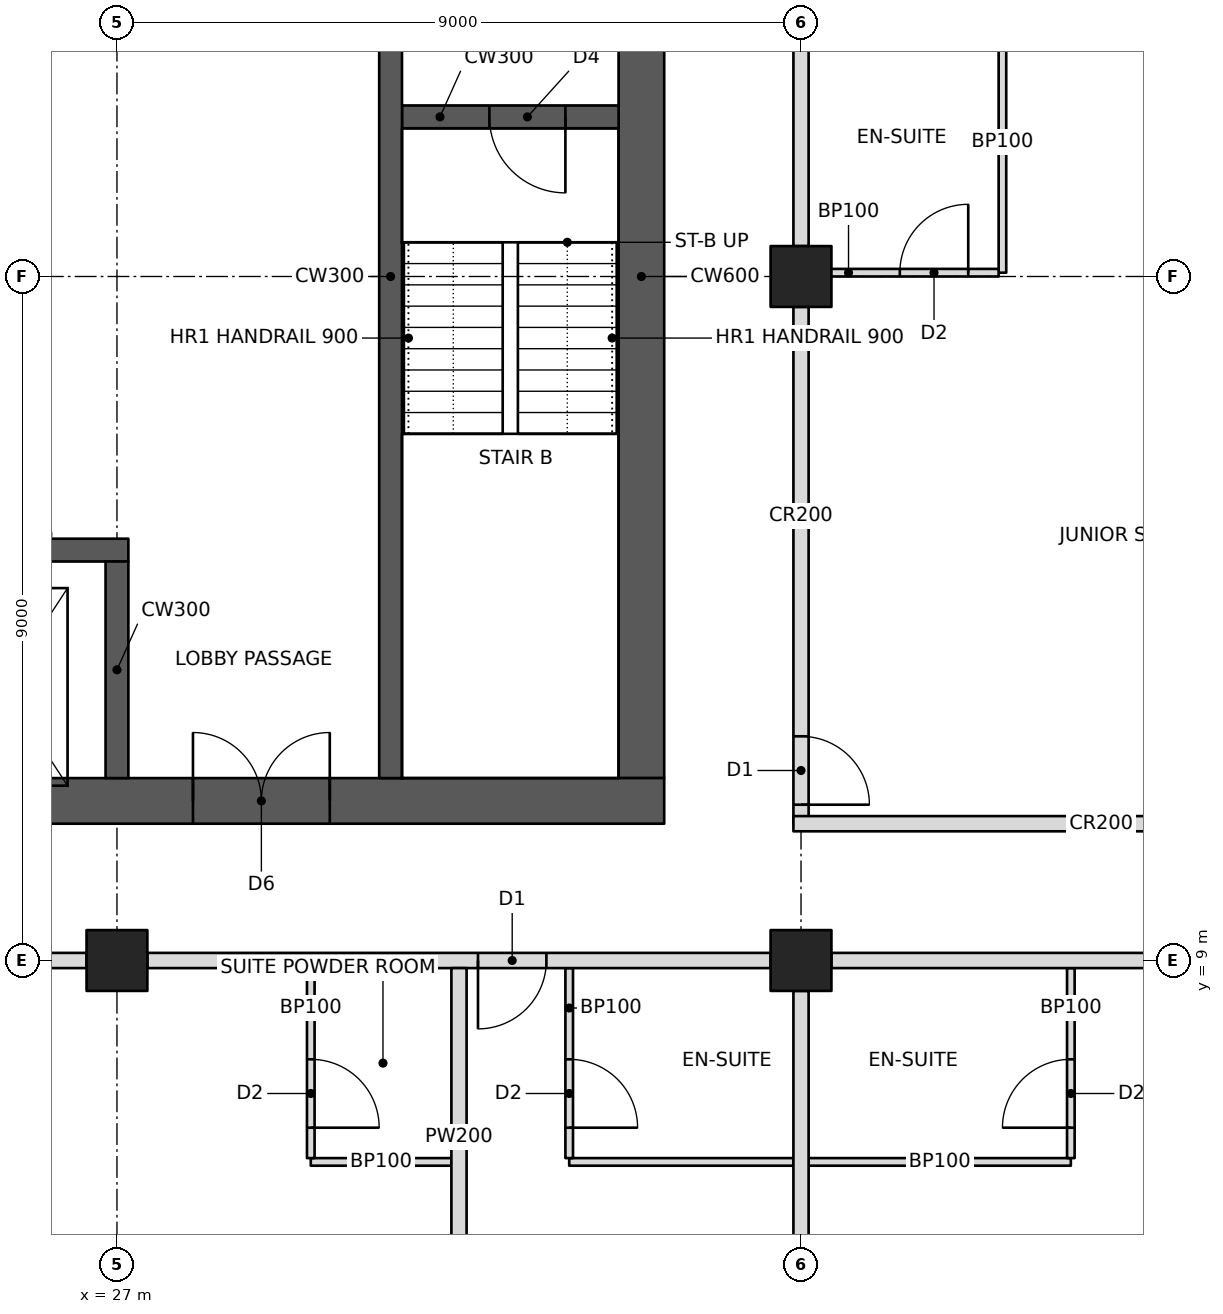
"""IFC4 building model, lengths in metres.
Left out: names, types, materials, properties, quantities, classifications, styles, units other than length and angle.
Written with IfcOpenShell. Run it as: python <this file> out.ifc"""

import sys

from ifc_helpers import new_model, si_unit, direction, frame, frame_2d, origin, origin_2d, place, context, subcontext, project, spatial, rectangle, hollow_rectangle, extrude, element, fill, save


model = new_model("IFC4")
c1 = context("Model", 3, precision=1e-05, world=origin(), true_north=direction((0.0, 1.0)))
c2 = subcontext(c1, "Body", "Model", "MODEL_VIEW")
j1 = project(units=[si_unit("LENGTHUNIT", "METRE"), si_unit("PLANEANGLEUNIT", "RADIAN")], contexts=[c1])
p1 = place(None, origin())
s1 = spatial("IfcSite", under=j1, at=p1, CompositionType="ELEMENT")
p2 = place(p1, origin())
s2 = spatial("IfcBuilding", under=s1, at=p2, CompositionType="ELEMENT")
p3 = place(p2, frame((0.0, 0.0, 148.6)))
s3 = spatial("IfcBuildingStorey", under=s2, at=p3, CompositionType="ELEMENT", Elevation=148.6)
for number, where, z_axis, x_axis in (
    (1, (27.0, 9.0, 0.0), (0.0, 0.0, 1.0), (1.0, 0.0, 0.0)),
    (2, (36.0, 9.0, 0.0), (0.0, 0.0, 1.0), (0.0, 1.0, 0.0)),
    (3, (36.0, 18.0, 0.0), (0.0, 0.0, 1.0), (0.0, 1.0, 0.0)),
):
    element("IfcColumn", number, at=place(p3, frame(where, z_axis=z_axis, x_axis=x_axis)), inside=s3, PredefinedType="COLUMN", context=c2, shape_type="SweptSolid", body=[
        extrude(hollow_rectangle(XDim=0.8, YDim=0.8, WallThickness=0.07, at=origin_2d()), origin(), (0.0, 0.0, 1.0), 3.4),
    ])
p4 = place(p3, frame((10.8, 11.1, 0.0), z_axis=(0.0, 0.0, 1.0), x_axis=(1.0, 0.0, 0.0)))
e4 = element("IfcWall", 4, at=p4, inside=s3, PredefinedType="SHEAR", context=c2, shape_type="SweptSolid", body=[
    extrude(rectangle(XDim=23.4, YDim=0.6, at=frame_2d((11.7, 0.0))), origin(), (0.0, 0.0, 1.0), 3.4),
])
p5 = place(p4, frame((1.0, 0.0, 0.0)))
e5 = element("IfcOpeningElement", 5, at=p5, cuts=e4, PredefinedType="OPENING", context=c2, shape_type="SweptSolid", body=[
    extrude(rectangle(XDim=1.0, YDim=2.1, at=frame_2d((0.5, 1.05))), frame((0.0, 0.31, 0.0), z_axis=(0.0, -1.0, 0.0), x_axis=(1.0, 0.0, 0.0)), (0.0, 0.0, 1.0), 0.62),
])
p6 = place(p4, frame((17.2, 0.0, 0.0)))
e6 = element("IfcOpeningElement", 6, at=p6, cuts=e4, PredefinedType="OPENING", context=c2, shape_type="SweptSolid", body=[
    extrude(rectangle(XDim=1.8, YDim=2.1, at=frame_2d((0.9, 1.05))), frame((0.0, 0.31, 0.0), z_axis=(0.0, -1.0, 0.0), x_axis=(1.0, 0.0, 0.0)), (0.0, 0.0, 1.0), 0.62),
])
p7 = place(p3, frame((33.9, 11.4, 0.0), z_axis=(0.0, 0.0, 1.0), x_axis=(0.0, 1.0, 0.0)))
e7 = element("IfcWall", 7, at=p7, inside=s3, PredefinedType="SHEAR", context=c2, shape_type="SweptSolid", body=[
    extrude(rectangle(XDim=13.2, YDim=0.6, at=frame_2d((6.6, 0.0))), origin(), (0.0, 0.0, 1.0), 3.4),
])
p8 = place(p3, frame((18.15, 14.4, 0.0), z_axis=(0.0, 0.0, 1.0), x_axis=(1.0, 0.0, 0.0)))
e8 = element("IfcWall", 8, at=p8, inside=s3, PredefinedType="SHEAR", context=c2, shape_type="SweptSolid", body=[
    extrude(rectangle(XDim=9.0, YDim=0.3, at=frame_2d((4.5, 0.0))), origin(), (0.0, 0.0, 1.0), 3.4),
])
p9 = place(p8, frame((0.8, 0.0, 0.0)))
e9 = element("IfcOpeningElement", 9, at=p9, cuts=e8, PredefinedType="OPENING", context=c2, shape_type="SweptSolid", body=[
    extrude(rectangle(XDim=1.1, YDim=2.1, at=frame_2d((0.55, 1.05))), frame((0.0, 0.16, 0.0), z_axis=(0.0, -1.0, 0.0), x_axis=(1.0, 0.0, 0.0)), (0.0, 0.0, 1.0), 0.32),
])
p10 = place(p8, frame((3.8, 0.0, 0.0)))
e10 = element("IfcOpeningElement", 10, at=p10, cuts=e8, PredefinedType="OPENING", context=c2, shape_type="SweptSolid", body=[
    extrude(rectangle(XDim=1.1, YDim=2.1, at=frame_2d((0.55, 1.05))), frame((0.0, 0.16, 0.0), z_axis=(0.0, -1.0, 0.0), x_axis=(1.0, 0.0, 0.0)), (0.0, 0.0, 1.0), 0.32),
])
p11 = place(p8, frame((6.75, 0.0, 0.0)))
e11 = element("IfcOpeningElement", 11, at=p11, cuts=e8, PredefinedType="OPENING", context=c2, shape_type="SweptSolid", body=[
    extrude(rectangle(XDim=1.2, YDim=2.1, at=frame_2d((0.6, 1.05))), frame((0.0, 0.16, 0.0), z_axis=(0.0, -1.0, 0.0), x_axis=(1.0, 0.0, 0.0)), (0.0, 0.0, 1.0), 0.32),
])
p12 = place(p3, frame((27.0, 11.4, 0.0), z_axis=(0.0, 0.0, 1.0), x_axis=(0.0, 1.0, 0.0)))
e12 = element("IfcWall", 12, at=p12, inside=s3, PredefinedType="SHEAR", context=c2, shape_type="SweptSolid", body=[
    extrude(rectangle(XDim=2.85, YDim=0.3, at=frame_2d((1.425, 0.0))), origin(), (0.0, 0.0, 1.0), 3.4),
])
p13 = place(p3, frame((30.6, 11.4, 0.0), z_axis=(0.0, 0.0, 1.0), x_axis=(0.0, 1.0, 0.0)))
e13 = element("IfcWall", 13, at=p13, inside=s3, PredefinedType="SHEAR", context=c2, shape_type="SweptSolid", body=[
    extrude(rectangle(XDim=13.2, YDim=0.3, at=frame_2d((6.6, 0.0))), origin(), (0.0, 0.0, 1.0), 3.4),
])
p14 = place(p3, frame((30.75, 20.1, 0.0), z_axis=(0.0, 0.0, 1.0), x_axis=(1.0, 0.0, 0.0)))
e14 = element("IfcWall", 14, at=p14, inside=s3, PredefinedType="SHEAR", context=c2, shape_type="SweptSolid", body=[
    extrude(rectangle(XDim=2.85, YDim=0.3, at=frame_2d((1.425, 0.0))), origin(), (0.0, 0.0, 1.0), 3.4),
])
p15 = place(p14, frame((1.15, 0.0, 0.0)))
e15 = element("IfcOpeningElement", 15, at=p15, cuts=e14, PredefinedType="OPENING", context=c2, shape_type="SweptSolid", body=[
    extrude(rectangle(XDim=1.0, YDim=2.1, at=frame_2d((0.5, 1.05))), frame((0.0, 0.16, 0.0), z_axis=(0.0, -1.0, 0.0), x_axis=(1.0, 0.0, 0.0)), (0.0, 0.0, 1.0), 0.32),
])
p16 = place(p3, frame((18.4, 9.0, 0.0), z_axis=(0.0, 0.0, 1.0), x_axis=(1.0, 0.0, 0.0)))
e16 = element("IfcWall", 16, at=p16, inside=s3, PredefinedType="PARTITIONING", context=c2, shape_type="SweptSolid", body=[
    extrude(rectangle(XDim=8.2, YDim=0.2, at=frame_2d((4.1, 0.0))), origin(), (0.0, 0.0, 1.0), 2.405),
])
p17 = place(p16, frame((2.95, 0.0, 0.0)))
e17 = element("IfcOpeningElement", 17, at=p17, cuts=e16, PredefinedType="OPENING", context=c2, shape_type="SweptSolid", body=[
    extrude(rectangle(XDim=0.9, YDim=2.1, at=frame_2d((0.45, 1.05))), frame((0.0, 0.11, 0.0), z_axis=(0.0, -1.0, 0.0), x_axis=(1.0, 0.0, 0.0)), (0.0, 0.0, 1.0), 0.22),
])
p18 = place(p16, frame((4.35, 0.0, 0.0)))
e18 = element("IfcOpeningElement", 18, at=p18, cuts=e16, PredefinedType="OPENING", context=c2, shape_type="SweptSolid", body=[
    extrude(rectangle(XDim=0.9, YDim=2.1, at=frame_2d((0.45, 1.05))), frame((0.0, 0.11, 0.0), z_axis=(0.0, -1.0, 0.0), x_axis=(1.0, 0.0, 0.0)), (0.0, 0.0, 1.0), 0.22),
])
p19 = place(p3, frame((27.4, 9.0, 0.0), z_axis=(0.0, 0.0, 1.0), x_axis=(1.0, 0.0, 0.0)))
e19 = element("IfcWall", 19, at=p19, inside=s3, PredefinedType="PARTITIONING", context=c2, shape_type="SweptSolid", body=[
    extrude(rectangle(XDim=8.2, YDim=0.2, at=frame_2d((4.1, 0.0))), origin(), (0.0, 0.0, 1.0), 2.405),
])
p20 = place(p19, frame((4.35, 0.0, 0.0)))
e20 = element("IfcOpeningElement", 20, at=p20, cuts=e19, PredefinedType="OPENING", context=c2, shape_type="SweptSolid", body=[
    extrude(rectangle(XDim=0.9, YDim=2.1, at=frame_2d((0.45, 1.05))), frame((0.0, 0.11, 0.0), z_axis=(0.0, -1.0, 0.0), x_axis=(1.0, 0.0, 0.0)), (0.0, 0.0, 1.0), 0.22),
])
p21 = place(p3, frame((36.4, 9.0, 0.0), z_axis=(0.0, 0.0, 1.0), x_axis=(1.0, 0.0, 0.0)))
e21 = element("IfcWall", 21, at=p21, inside=s3, PredefinedType="PARTITIONING", context=c2, shape_type="SweptSolid", body=[
    extrude(rectangle(XDim=7.6, YDim=0.2, at=frame_2d((3.8, 0.0))), origin(), (0.0, 0.0, 1.0), 2.438),
])
p22 = place(p21, frame((6.45, 0.0, 0.0)))
e22 = element("IfcOpeningElement", 22, at=p22, cuts=e21, PredefinedType="OPENING", context=c2, shape_type="SweptSolid", body=[
    extrude(rectangle(XDim=0.9, YDim=2.1, at=frame_2d((0.45, 1.05))), frame((0.0, 0.11, 0.0), z_axis=(0.0, -1.0, 0.0), x_axis=(1.0, 0.0, 0.0)), (0.0, 0.0, 1.0), 0.22),
])
p23 = place(p3, frame((36.0, 10.8, 0.0), z_axis=(0.0, 0.0, 1.0), x_axis=(0.0, 1.0, 0.0)))
e23 = element("IfcWall", 23, at=p23, inside=s3, PredefinedType="PARTITIONING", context=c2, shape_type="SweptSolid", body=[
    extrude(rectangle(XDim=6.8, YDim=0.2, at=frame_2d((3.4, 0.0))), origin(), (0.0, 0.0, 1.0), 2.405),
])
p24 = place(p23, frame((0.25, 0.0, 0.0)))
e24 = element("IfcOpeningElement", 24, at=p24, cuts=e23, PredefinedType="OPENING", context=c2, shape_type="SweptSolid", body=[
    extrude(rectangle(XDim=0.9, YDim=2.1, at=frame_2d((0.45, 1.05))), frame((0.0, 0.11, 0.0), z_axis=(0.0, -1.0, 0.0), x_axis=(1.0, 0.0, 0.0)), (0.0, 0.0, 1.0), 0.22),
])
p25 = place(p3, frame((36.0, 18.4, 0.0), z_axis=(0.0, 0.0, 1.0), x_axis=(0.0, 1.0, 0.0)))
e25 = element("IfcWall", 25, at=p25, inside=s3, PredefinedType="PARTITIONING", context=c2, shape_type="SweptSolid", body=[
    extrude(rectangle(XDim=6.8, YDim=0.2, at=frame_2d((3.4, 0.0))), origin(), (0.0, 0.0, 1.0), 2.405),
])
p26 = place(p25, frame((3.45, 0.0, 0.0)))
e26 = element("IfcOpeningElement", 26, at=p26, cuts=e25, PredefinedType="OPENING", context=c2, shape_type="SweptSolid", body=[
    extrude(rectangle(XDim=0.9, YDim=2.1, at=frame_2d((0.45, 1.05))), frame((0.0, 0.11, 0.0), z_axis=(0.0, -1.0, 0.0), x_axis=(1.0, 0.0, 0.0)), (0.0, 0.0, 1.0), 0.22),
])
p27 = place(p3, frame((35.9, 10.8, 0.0), z_axis=(0.0, 0.0, 1.0), x_axis=(1.0, 0.0, 0.0)))
e27 = element("IfcWall", 27, at=p27, inside=s3, PredefinedType="PARTITIONING", context=c2, shape_type="SweptSolid", body=[
    extrude(rectangle(XDim=8.1, YDim=0.2, at=frame_2d((4.05, 0.0))), origin(), (0.0, 0.0, 1.0), 2.404),
])
p28 = place(p3, frame((31.5, 8.9, 0.0), z_axis=(0.0, 0.0, 1.0), x_axis=(0.0, -1.0, 0.0)))
e28 = element("IfcWall", 28, at=p28, inside=s3, PredefinedType="PARTITIONING", context=c2, shape_type="SweptSolid", body=[
    extrude(rectangle(XDim=7.9, YDim=0.2, at=frame_2d((3.95, 0.0))), origin(), (0.0, 0.0, 1.0), 2.404),
])
p29 = place(p28, frame((4.6, 0.0, 0.0)))
e29 = element("IfcOpeningElement", 29, at=p29, cuts=e28, PredefinedType="OPENING", context=c2, shape_type="SweptSolid", body=[
    extrude(rectangle(XDim=1.0, YDim=2.1, at=frame_2d((0.5, 1.05))), frame((0.0, 0.11, 0.0), z_axis=(0.0, -1.0, 0.0), x_axis=(1.0, 0.0, 0.0)), (0.0, 0.0, 1.0), 0.22),
])
p30 = place(p3, frame((36.0, 8.6, 0.0), z_axis=(0.0, 0.0, 1.0), x_axis=(0.0, -1.0, 0.0)))
e30 = element("IfcWall", 30, at=p30, inside=s3, PredefinedType="PARTITIONING", context=c2, shape_type="SweptSolid", body=[
    extrude(rectangle(XDim=7.6, YDim=0.2, at=frame_2d((3.8, 0.0))), origin(), (0.0, 0.0, 1.0), 2.438),
])
p31 = place(p3, frame((29.55, 6.35, 0.0), z_axis=(0.0, 0.0, 1.0), x_axis=(1.0, 0.0, 0.0)))
e31 = element("IfcWall", 31, at=p31, inside=s3, PredefinedType="PARTITIONING", context=c2, shape_type="SweptSolid", body=[
    extrude(rectangle(XDim=1.85, YDim=0.1, at=frame_2d((0.925, 0.0))), origin(), (0.0, 0.0, 1.0), 3.2),
])
p32 = place(p3, frame((29.55, 8.9, 0.0), z_axis=(0.0, 0.0, 1.0), x_axis=(0.0, -1.0, 0.0)))
e32 = element("IfcWall", 32, at=p32, inside=s3, PredefinedType="PARTITIONING", context=c2, shape_type="SweptSolid", body=[
    extrude(rectangle(XDim=2.5, YDim=0.1, at=frame_2d((1.25, 0.0))), origin(), (0.0, 0.0, 1.0), 2.404),
])
p33 = place(p32, frame((1.2, 0.0, 0.0)))
e33 = element("IfcOpeningElement", 33, at=p33, cuts=e32, PredefinedType="OPENING", context=c2, shape_type="SweptSolid", body=[
    extrude(rectangle(XDim=0.9, YDim=2.1, at=frame_2d((0.45, 1.05))), frame((0.0, 0.06, 0.0), z_axis=(0.0, -1.0, 0.0), x_axis=(1.0, 0.0, 0.0)), (0.0, 0.0, 1.0), 0.12),
])
p34 = place(p3, frame((32.95, 6.35, 0.0), z_axis=(0.0, 0.0, 1.0), x_axis=(1.0, 0.0, 0.0)))
e34 = element("IfcWall", 34, at=p34, inside=s3, PredefinedType="PARTITIONING", context=c2, shape_type="SweptSolid", body=[
    extrude(rectangle(XDim=2.95, YDim=0.1, at=frame_2d((1.475, 0.0))), origin(), (0.0, 0.0, 1.0), 2.438),
])
p35 = place(p3, frame((32.95, 8.9, 0.0), z_axis=(0.0, 0.0, 1.0), x_axis=(0.0, -1.0, 0.0)))
e35 = element("IfcWall", 35, at=p35, inside=s3, PredefinedType="PARTITIONING", context=c2, shape_type="SweptSolid", body=[
    extrude(rectangle(XDim=2.5, YDim=0.1, at=frame_2d((1.25, 0.0))), origin(), (0.0, 0.0, 1.0), 2.404),
])
p36 = place(p35, frame((1.2, 0.0, 0.0)))
e36 = element("IfcOpeningElement", 36, at=p36, cuts=e35, PredefinedType="OPENING", context=c2, shape_type="SweptSolid", body=[
    extrude(rectangle(XDim=0.9, YDim=2.1, at=frame_2d((0.45, 1.05))), frame((0.0, 0.06, 0.0), z_axis=(0.0, -1.0, 0.0), x_axis=(1.0, 0.0, 0.0)), (0.0, 0.0, 1.0), 0.12),
])
p37 = place(p3, frame((36.1, 6.35, 0.0), z_axis=(0.0, 0.0, 1.0), x_axis=(1.0, 0.0, 0.0)))
e37 = element("IfcWall", 37, at=p37, inside=s3, PredefinedType="PARTITIONING", context=c2, shape_type="SweptSolid", body=[
    extrude(rectangle(XDim=3.45, YDim=0.1, at=frame_2d((1.725, 0.0))), origin(), (0.0, 0.0, 1.0), 2.438),
])
p38 = place(p3, frame((39.55, 8.9, 0.0), z_axis=(0.0, 0.0, 1.0), x_axis=(0.0, -1.0, 0.0)))
e38 = element("IfcWall", 38, at=p38, inside=s3, PredefinedType="PARTITIONING", context=c2, shape_type="SweptSolid", body=[
    extrude(rectangle(XDim=2.5, YDim=0.1, at=frame_2d((1.25, 0.0))), origin(), (0.0, 0.0, 1.0), 2.438),
])
p39 = place(p38, frame((1.2, 0.0, 0.0)))
e39 = element("IfcOpeningElement", 39, at=p39, cuts=e38, PredefinedType="OPENING", context=c2, shape_type="SweptSolid", body=[
    extrude(rectangle(XDim=0.9, YDim=2.1, at=frame_2d((0.45, 1.05))), frame((0.0, 0.06, 0.0), z_axis=(0.0, -1.0, 0.0), x_axis=(1.0, 0.0, 0.0)), (0.0, 0.0, 1.0), 0.12),
])
p40 = place(p3, frame((38.65, 18.05, 0.0), z_axis=(0.0, 0.0, 1.0), x_axis=(0.0, 1.0, 0.0)))
e40 = element("IfcWall", 40, at=p40, inside=s3, PredefinedType="PARTITIONING", context=c2, shape_type="SweptSolid", body=[
    extrude(rectangle(XDim=3.45, YDim=0.1, at=frame_2d((1.725, 0.0))), origin(), (0.0, 0.0, 1.0), 2.404),
])
p41 = place(p3, frame((36.1, 18.05, 0.0), z_axis=(0.0, 0.0, 1.0), x_axis=(1.0, 0.0, 0.0)))
e41 = element("IfcWall", 41, at=p41, inside=s3, PredefinedType="PARTITIONING", context=c2, shape_type="SweptSolid", body=[
    extrude(rectangle(XDim=2.5, YDim=0.1, at=frame_2d((1.25, 0.0))), origin(), (0.0, 0.0, 1.0), 2.405),
])
p42 = place(p41, frame((1.2, 0.0, 0.0)))
e42 = element("IfcOpeningElement", 42, at=p42, cuts=e41, PredefinedType="OPENING", context=c2, shape_type="SweptSolid", body=[
    extrude(rectangle(XDim=0.9, YDim=2.1, at=frame_2d((0.45, 1.05))), frame((0.0, 0.06, 0.0), z_axis=(0.0, -1.0, 0.0), x_axis=(1.0, 0.0, 0.0)), (0.0, 0.0, 1.0), 0.12),
])
p43 = place(p33, origin())
e43 = element("IfcDoor", 43, at=p43, inside=s3, OperationType="SINGLE_SWING_RIGHT", PredefinedType="DOOR", context=c2, shape_type="SweptSolid", body=[
    extrude(rectangle(XDim=0.9, YDim=2.1, at=frame_2d((0.45, 1.05))), frame((0.0, 0.025, 0.0), z_axis=(0.0, -1.0, 0.0), x_axis=(1.0, 0.0, 0.0)), (0.0, 0.0, 1.0), 0.05),
])
fill(e33, e43)
p44 = place(p36, origin())
e44 = element("IfcDoor", 44, at=p44, inside=s3, OperationType="SINGLE_SWING_RIGHT", PredefinedType="DOOR", context=c2, shape_type="SweptSolid", body=[
    extrude(rectangle(XDim=0.9, YDim=2.1, at=frame_2d((0.45, 1.05))), frame((0.0, 0.025, 0.0), z_axis=(0.0, -1.0, 0.0), x_axis=(1.0, 0.0, 0.0)), (0.0, 0.0, 1.0), 0.05),
])
fill(e36, e44)
p45 = place(p20, frame((0.9, 0.0, 0.0), z_axis=(0.0, 0.0, 1.0), x_axis=(-1.0, 0.0, 0.0)))
e45 = element("IfcDoor", 45, at=p45, inside=s3, OperationType="SINGLE_SWING_RIGHT", PredefinedType="DOOR", context=c2, shape_type="SweptSolid", body=[
    extrude(rectangle(XDim=0.9, YDim=2.1, at=frame_2d((0.45, 1.05))), frame((0.0, 0.025, 0.0), z_axis=(0.0, -1.0, 0.0), x_axis=(1.0, 0.0, 0.0)), (0.0, 0.0, 1.0), 0.05),
])
fill(e20, e45)
p46 = place(p39, frame((0.9, 0.0, 0.0), z_axis=(0.0, 0.0, 1.0), x_axis=(-1.0, 0.0, 0.0)))
e46 = element("IfcDoor", 46, at=p46, inside=s3, OperationType="SINGLE_SWING_LEFT", PredefinedType="DOOR", context=c2, shape_type="SweptSolid", body=[
    extrude(rectangle(XDim=0.9, YDim=2.1, at=frame_2d((0.45, 1.05))), frame((0.0, 0.025, 0.0), z_axis=(0.0, -1.0, 0.0), x_axis=(1.0, 0.0, 0.0)), (0.0, 0.0, 1.0), 0.05),
])
fill(e39, e46)
p47 = place(p42, origin())
e47 = element("IfcDoor", 47, at=p47, inside=s3, OperationType="SINGLE_SWING_RIGHT", PredefinedType="DOOR", context=c2, shape_type="SweptSolid", body=[
    extrude(rectangle(XDim=0.9, YDim=2.1, at=frame_2d((0.45, 1.05))), frame((0.0, 0.025, 0.0), z_axis=(0.0, -1.0, 0.0), x_axis=(1.0, 0.0, 0.0)), (0.0, 0.0, 1.0), 0.05),
])
fill(e42, e47)
p48 = place(p24, frame((0.9, 0.0, 0.0), z_axis=(0.0, 0.0, 1.0), x_axis=(-1.0, 0.0, 0.0)))
e48 = element("IfcDoor", 48, at=p48, inside=s3, OperationType="SINGLE_SWING_RIGHT", PredefinedType="DOOR", context=c2, shape_type="SweptSolid", body=[
    extrude(rectangle(XDim=0.9, YDim=2.1, at=frame_2d((0.45, 1.05))), frame((0.0, 0.025, 0.0), z_axis=(0.0, -1.0, 0.0), x_axis=(1.0, 0.0, 0.0)), (0.0, 0.0, 1.0), 0.05),
])
fill(e24, e48)
p49 = place(p6, origin())
e49 = element("IfcDoor", 49, at=p49, inside=s3, OperationType="DOUBLE_DOOR_SINGLE_SWING", PredefinedType="DOOR", context=c2, shape_type="SweptSolid", body=[
    extrude(rectangle(XDim=1.8, YDim=2.1, at=frame_2d((0.9, 1.05))), frame((0.0, 0.025, 0.0), z_axis=(0.0, -1.0, 0.0), x_axis=(1.0, 0.0, 0.0)), (0.0, 0.0, 1.0), 0.05),
])
fill(e6, e49)
p50 = place(p15, frame((1.0, 0.0, 0.0), z_axis=(0.0, 0.0, 1.0), x_axis=(-1.0, 0.0, 0.0)))
e50 = element("IfcDoor", 50, at=p50, inside=s3, OperationType="SINGLE_SWING_LEFT", PredefinedType="DOOR", context=c2, shape_type="SweptSolid", body=[
    extrude(rectangle(XDim=1.0, YDim=2.1, at=frame_2d((0.5, 1.05))), frame((0.0, 0.025, 0.0), z_axis=(0.0, -1.0, 0.0), x_axis=(1.0, 0.0, 0.0)), (0.0, 0.0, 1.0), 0.05),
])
fill(e15, e50)
save(model, sys.argv[1])
